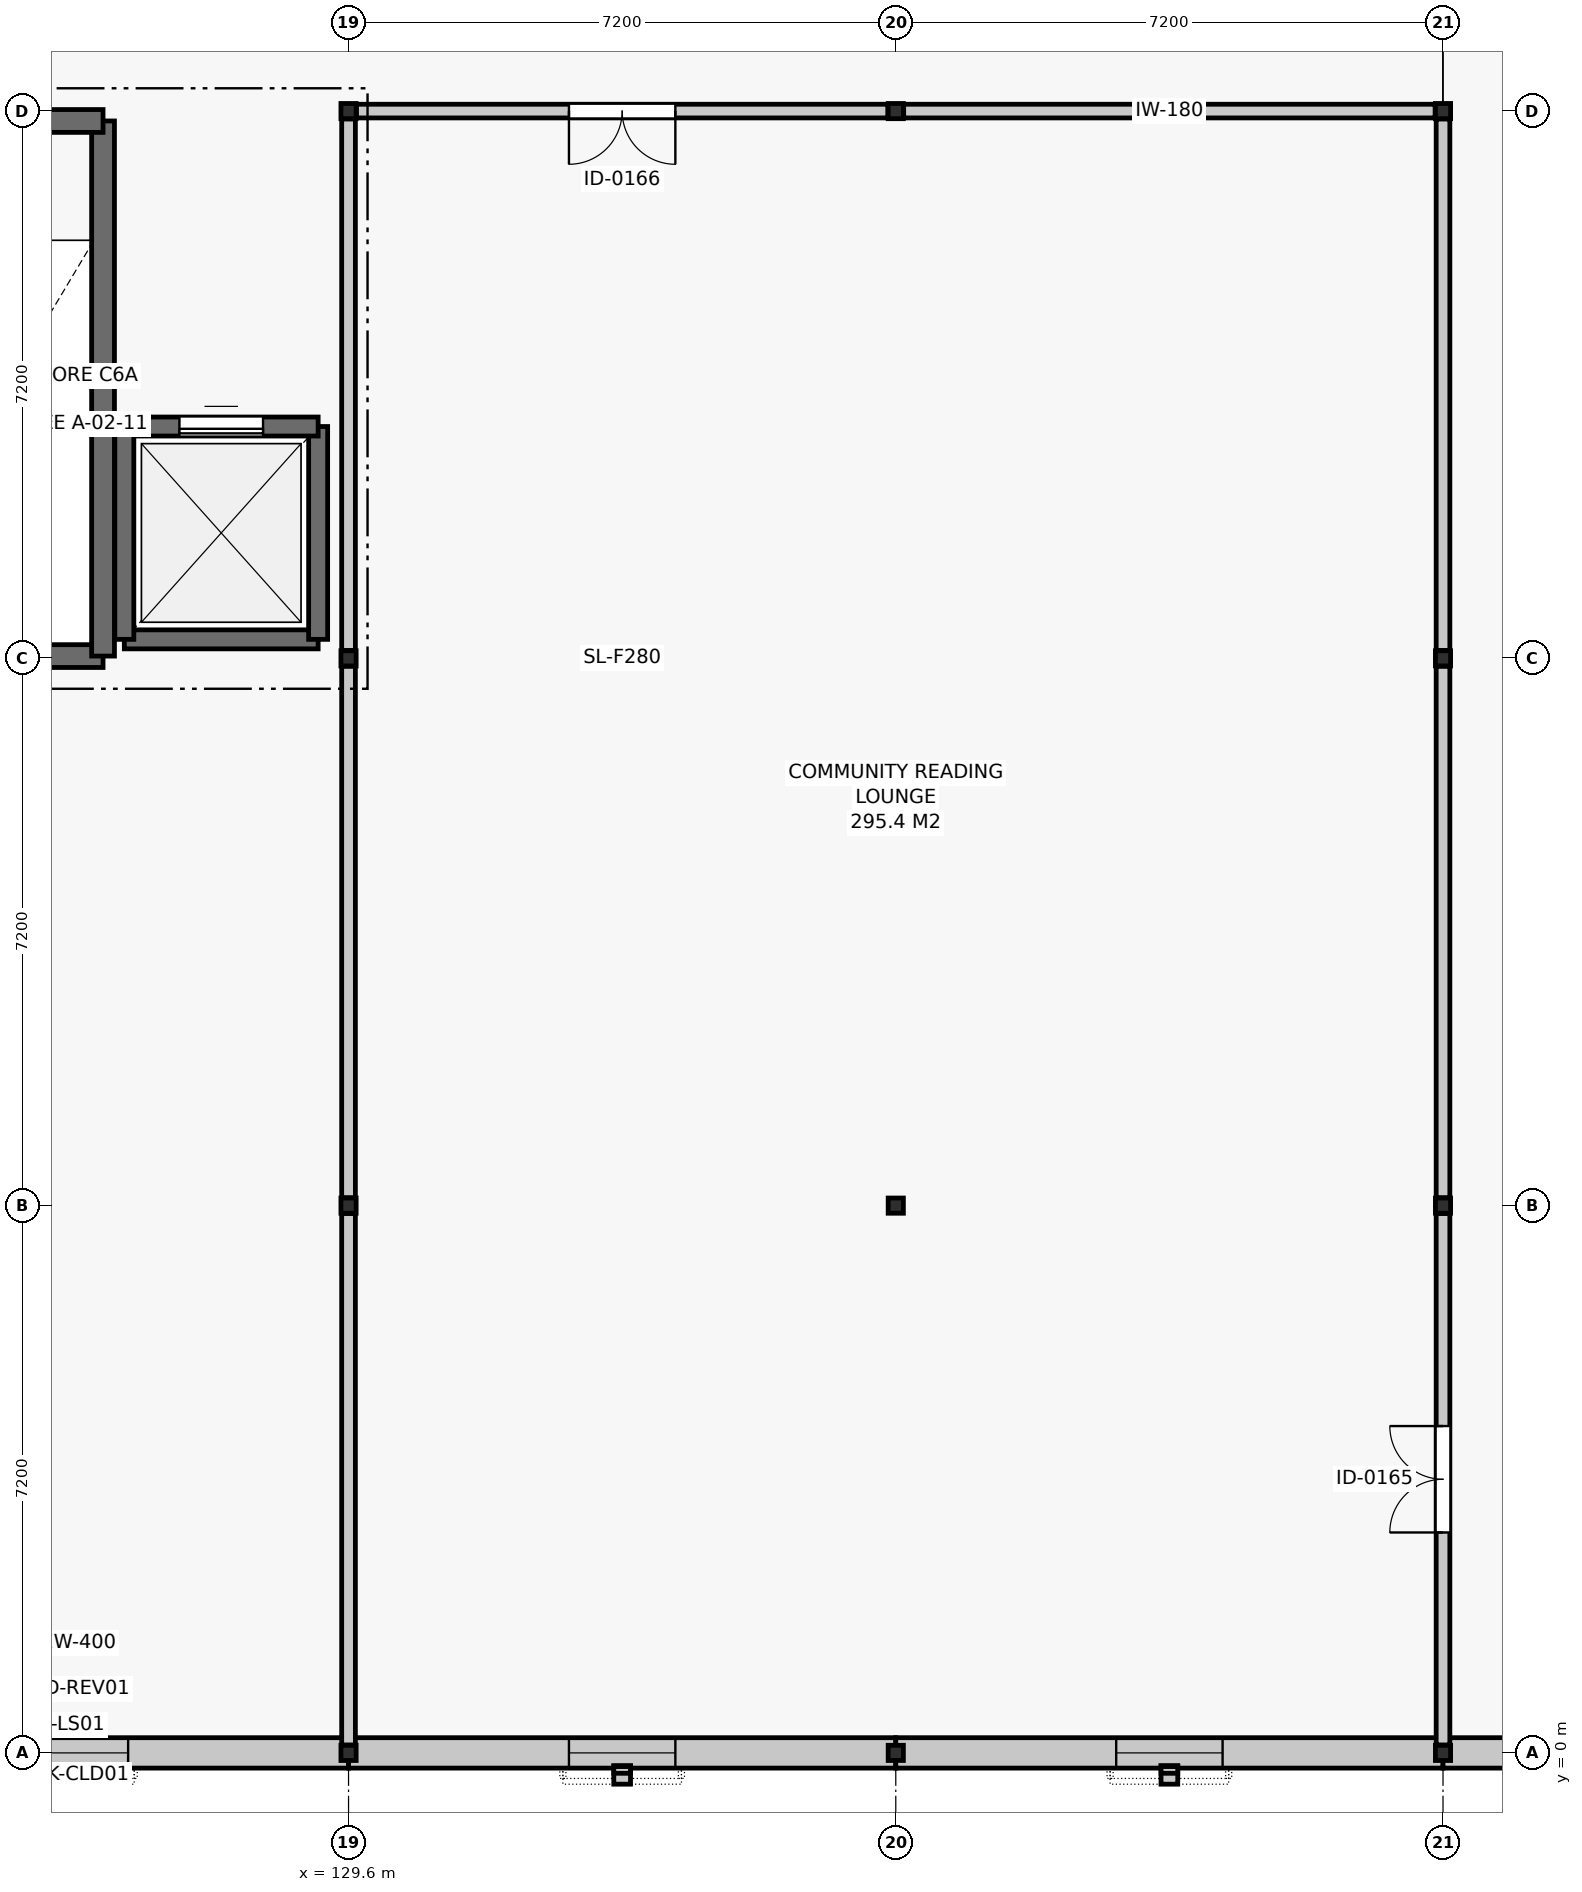
"""IFC4 building model, lengths in metres.
Left out: names, types, materials, properties, quantities, classifications, styles, units other than length and angle.
Written with IfcOpenShell. Run it as: python <this file> out.ifc"""

import sys

from ifc_helpers import new_model, si_unit, direction, frame, frame_2d, origin, origin_2d, place, context, subcontext, project, spatial, rectangle, i_section, extrude, element, fill, save


model = new_model("IFC4")
c1 = context("Model", 3, precision=1e-05, world=origin(), true_north=direction((0.0, 1.0)))
c2 = subcontext(c1, "Body", "Model", "MODEL_VIEW")
j1 = project(units=[si_unit("LENGTHUNIT", "METRE"), si_unit("PLANEANGLEUNIT", "RADIAN")], contexts=[c1])
p1 = place(None, origin())
s1 = spatial("IfcSite", under=j1, at=p1, CompositionType="ELEMENT")
p2 = place(p1, origin())
s2 = spatial("IfcBuilding", under=s1, at=p2, CompositionType="ELEMENT")
p3 = place(p2, frame((0.0, 0.0, 14.4)))
s3 = spatial("IfcBuildingStorey", under=s2, at=p3, CompositionType="ELEMENT", Elevation=14.4)
for number, where, z_axis, x_axis in (
    (1, (129.6, 0.0, 0.0), (0.0, 0.0, 1.0), (1.0, 0.0, 0.0)),
    (2, (129.6, 7.2, 0.0), (0.0, 0.0, 1.0), (1.0, 0.0, 0.0)),
    (3, (129.6, 14.4, 0.0), (0.0, 0.0, 1.0), (1.0, 0.0, 0.0)),
    (4, (129.6, 21.6, 0.0), (0.0, 0.0, 1.0), (1.0, 0.0, 0.0)),
    (5, (136.8, 0.0, 0.0), (0.0, 0.0, 1.0), (1.0, 0.0, 0.0)),
    (6, (136.8, 7.2, 0.0), (0.0, 0.0, 1.0), (1.0, 0.0, 0.0)),
    (7, (136.8, 21.6, 0.0), (0.0, 0.0, 1.0), (1.0, 0.0, 0.0)),
    (8, (144.0, 0.0, 0.0), (0.0, 0.0, 1.0), (1.0, 0.0, 0.0)),
    (9, (144.0, 7.2, 0.0), (0.0, 0.0, 1.0), (1.0, 0.0, 0.0)),
    (10, (144.0, 14.4, 0.0), (0.0, 0.0, 1.0), (1.0, 0.0, 0.0)),
    (11, (144.0, 21.6, 0.0), (0.0, 0.0, 1.0), (1.0, 0.0, 0.0)),
):
    element("IfcColumn", number, at=place(p3, frame(where, z_axis=z_axis, x_axis=x_axis)), inside=s3, PredefinedType="COLUMN", context=c2, shape_type="SweptSolid", body=[
        extrude(i_section(OverallWidth=0.2, OverallDepth=0.2, WebThickness=0.009, FlangeThickness=0.015, FilletRadius=0.018, at=origin_2d()), origin(), (0.0, 0.0, 1.0), 4.2),
    ])
p4 = place(p3, frame((122.504, 0.0, 0.0), z_axis=(0.0, 0.0, 1.0), x_axis=(1.0, 0.0, 0.0)))
e12 = element("IfcWall", 12, at=p4, inside=s3, PredefinedType="SOLIDWALL", context=c2, shape_type="SweptSolid", body=[
    extrude(rectangle(XDim=7.096, YDim=0.4, at=frame_2d((3.548, 0.0))), origin(), (0.0, 0.0, 1.0), 3.24),
])
p5 = place(p4, frame((2.796, 0.0, 0.95)))
e13 = element("IfcOpeningElement", 13, at=p5, cuts=e12, PredefinedType="OPENING", context=c2, shape_type="SweptSolid", body=[
    extrude(rectangle(XDim=1.4, YDim=1.85, at=frame_2d((0.7, 0.925))), frame((0.0, 0.212, 0.0), z_axis=(0.0, -1.0, 0.0), x_axis=(1.0, 0.0, 0.0)), (0.0, 0.0, 1.0), 0.424),
])
p6 = place(p3, frame((129.6, 0.0, 0.0), z_axis=(0.0, 0.0, 1.0), x_axis=(1.0, 0.0, 0.0)))
e14 = element("IfcWall", 14, at=p6, inside=s3, PredefinedType="SOLIDWALL", context=c2, shape_type="SweptSolid", body=[
    extrude(rectangle(XDim=7.2, YDim=0.4, at=frame_2d((3.6, 0.0))), origin(), (0.0, 0.0, 1.0), 3.24),
])
p7 = place(p6, frame((2.9, 0.0, 0.95)))
e15 = element("IfcOpeningElement", 15, at=p7, cuts=e14, PredefinedType="OPENING", context=c2, shape_type="SweptSolid", body=[
    extrude(rectangle(XDim=1.4, YDim=1.85, at=frame_2d((0.7, 0.925))), frame((0.0, 0.212, 0.0), z_axis=(0.0, -1.0, 0.0), x_axis=(1.0, 0.0, 0.0)), (0.0, 0.0, 1.0), 0.424),
])
p8 = place(p3, frame((136.8, 0.0, 0.0), z_axis=(0.0, 0.0, 1.0), x_axis=(1.0, 0.0, 0.0)))
e16 = element("IfcWall", 16, at=p8, inside=s3, PredefinedType="SOLIDWALL", context=c2, shape_type="SweptSolid", body=[
    extrude(rectangle(XDim=7.2, YDim=0.4, at=frame_2d((3.6, 0.0))), origin(), (0.0, 0.0, 1.0), 3.24),
])
p9 = place(p8, frame((2.9, 0.0, 0.95)))
e17 = element("IfcOpeningElement", 17, at=p9, cuts=e16, PredefinedType="OPENING", context=c2, shape_type="SweptSolid", body=[
    extrude(rectangle(XDim=1.4, YDim=1.85, at=frame_2d((0.7, 0.925))), frame((0.0, 0.212, 0.0), z_axis=(0.0, -1.0, 0.0), x_axis=(1.0, 0.0, 0.0)), (0.0, 0.0, 1.0), 0.424),
])
p10 = place(p3, frame((144.0, 0.0, 0.0), z_axis=(0.0, 0.0, 1.0), x_axis=(1.0, 0.0, 0.0)))
e18 = element("IfcWall", 18, at=p10, inside=s3, PredefinedType="SOLIDWALL", context=c2, shape_type="SweptSolid", body=[
    extrude(rectangle(XDim=7.2, YDim=0.4, at=frame_2d((3.6, 0.0))), origin(), (0.0, 0.0, 1.0), 3.24),
])
p11 = place(p3, frame((122.93, 14.43, 0.0), z_axis=(0.0, 0.0, 1.0), x_axis=(1.0, 0.0, 0.0)))
e19 = element("IfcWall", 19, at=p11, inside=s3, PredefinedType="SHEAR", context=c2, shape_type="SweptSolid", body=[
    extrude(rectangle(XDim=3.44, YDim=0.3, at=frame_2d((1.72, 0.0))), origin(), (0.0, 0.0, 1.0), 3.96),
])
p12 = place(p3, frame((126.37, 14.43, 0.0), z_axis=(0.0, 0.0, 1.0), x_axis=(0.0, 1.0, 0.0)))
e20 = element("IfcWall", 20, at=p12, inside=s3, PredefinedType="SHEAR", context=c2, shape_type="SweptSolid", body=[
    extrude(rectangle(XDim=7.04, YDim=0.3, at=frame_2d((3.52, 0.0))), origin(), (0.0, 0.0, 1.0), 3.96),
])
p13 = place(p3, frame((126.37, 21.47, 0.0), z_axis=(0.0, 0.0, 1.0), x_axis=(-1.0, 0.0, 0.0)))
e21 = element("IfcWall", 21, at=p13, inside=s3, PredefinedType="SHEAR", context=c2, shape_type="SweptSolid", body=[
    extrude(rectangle(XDim=3.44, YDim=0.3, at=frame_2d((1.72, 0.0))), origin(), (0.0, 0.0, 1.0), 3.96),
])
p14 = place(p13, frame((1.17, 0.0, 0.0)))
e22 = element("IfcOpeningElement", 22, at=p14, cuts=e21, PredefinedType="OPENING", context=c2, shape_type="SweptSolid", body=[
    extrude(rectangle(XDim=1.1, YDim=2.15, at=frame_2d((0.55, 1.075))), frame((0.0, 0.162, 0.0), z_axis=(0.0, -1.0, 0.0), x_axis=(1.0, 0.0, 0.0)), (0.0, 0.0, 1.0), 0.324),
])
p15 = place(p3, frame((126.65, 14.65, 0.0), z_axis=(0.0, 0.0, 1.0), x_axis=(1.0, 0.0, 0.0)))
e23 = element("IfcWall", 23, at=p15, inside=s3, PredefinedType="SHEAR", context=c2, shape_type="SweptSolid", body=[
    extrude(rectangle(XDim=2.55, YDim=0.25, at=frame_2d((1.275, 0.0))), origin(), (0.0, 0.0, 1.0), 3.96),
])
p16 = place(p3, frame((129.2, 14.65, 0.0), z_axis=(0.0, 0.0, 1.0), x_axis=(0.0, 1.0, 0.0)))
e24 = element("IfcWall", 24, at=p16, inside=s3, PredefinedType="SHEAR", context=c2, shape_type="SweptSolid", body=[
    extrude(rectangle(XDim=2.8, YDim=0.25, at=frame_2d((1.4, 0.0))), origin(), (0.0, 0.0, 1.0), 3.96),
])
p17 = place(p3, frame((129.2, 17.45, 0.0), z_axis=(0.0, 0.0, 1.0), x_axis=(-1.0, 0.0, 0.0)))
e25 = element("IfcWall", 25, at=p17, inside=s3, PredefinedType="SHEAR", context=c2, shape_type="SweptSolid", body=[
    extrude(rectangle(XDim=2.55, YDim=0.25, at=frame_2d((1.275, 0.0))), origin(), (0.0, 0.0, 1.0), 3.96),
])
p18 = place(p17, frame((0.725, 0.0, 0.0)))
e26 = element("IfcOpeningElement", 26, at=p18, cuts=e25, PredefinedType="OPENING", context=c2, shape_type="SweptSolid", body=[
    extrude(rectangle(XDim=1.1, YDim=2.1, at=frame_2d((0.55, 1.05))), frame((0.0, 0.137, 0.0), z_axis=(0.0, -1.0, 0.0), x_axis=(1.0, 0.0, 0.0)), (0.0, 0.0, 1.0), 0.274),
])
p19 = place(p3, frame((126.65, 17.45, 0.0), z_axis=(0.0, 0.0, 1.0), x_axis=(0.0, -1.0, 0.0)))
e27 = element("IfcWall", 27, at=p19, inside=s3, PredefinedType="SHEAR", context=c2, shape_type="SweptSolid", body=[
    extrude(rectangle(XDim=2.8, YDim=0.25, at=frame_2d((1.4, 0.0))), origin(), (0.0, 0.0, 1.0), 3.96),
])
p20 = place(p3, frame((129.704, 21.6, 0.0), z_axis=(0.0, 0.0, 1.0), x_axis=(1.0, 0.0, 0.0)))
e28 = element("IfcWall", 28, at=p20, inside=s3, PredefinedType="PARTITIONING", context=c2, shape_type="SweptSolid", body=[
    extrude(rectangle(XDim=6.992, YDim=0.18, at=frame_2d((3.496, 0.0))), origin(), (0.0, 0.0, 1.0), 3.245),
])
p21 = place(p20, frame((2.796, 0.0, 0.0)))
e29 = element("IfcOpeningElement", 29, at=p21, cuts=e28, PredefinedType="OPENING", context=c2, shape_type="SweptSolid", body=[
    extrude(rectangle(XDim=1.4, YDim=2.2, at=frame_2d((0.7, 1.1))), frame((0.0, 0.102, 0.0), z_axis=(0.0, -1.0, 0.0), x_axis=(1.0, 0.0, 0.0)), (0.0, 0.0, 1.0), 0.204),
])
p22 = place(p3, frame((136.904, 21.6, 0.0), z_axis=(0.0, 0.0, 1.0), x_axis=(1.0, 0.0, 0.0)))
e30 = element("IfcWall", 30, at=p22, inside=s3, PredefinedType="PARTITIONING", context=c2, shape_type="SweptSolid", body=[
    extrude(rectangle(XDim=6.992, YDim=0.18, at=frame_2d((3.496, 0.0))), origin(), (0.0, 0.0, 1.0), 3.245),
])
p23 = place(p3, frame((129.6, 0.104, 0.0), z_axis=(0.0, 0.0, 1.0), x_axis=(0.0, 1.0, 0.0)))
e31 = element("IfcWall", 31, at=p23, inside=s3, PredefinedType="PARTITIONING", context=c2, shape_type="SweptSolid", body=[
    extrude(rectangle(XDim=6.992, YDim=0.18, at=frame_2d((3.496, 0.0))), origin(), (0.0, 0.0, 1.0), 3.595),
])
p24 = place(p3, frame((129.6, 7.304, 0.0), z_axis=(0.0, 0.0, 1.0), x_axis=(0.0, 1.0, 0.0)))
e32 = element("IfcWall", 32, at=p24, inside=s3, PredefinedType="PARTITIONING", context=c2, shape_type="SweptSolid", body=[
    extrude(rectangle(XDim=6.992, YDim=0.18, at=frame_2d((3.496, 0.0))), origin(), (0.0, 0.0, 1.0), 3.055),
])
p25 = place(p3, frame((129.6, 14.504, 0.0), z_axis=(0.0, 0.0, 1.0), x_axis=(0.0, 1.0, 0.0)))
e33 = element("IfcWall", 33, at=p25, inside=s3, PredefinedType="PARTITIONING", context=c2, shape_type="SweptSolid", body=[
    extrude(rectangle(XDim=6.992, YDim=0.18, at=frame_2d((3.496, 0.0))), origin(), (0.0, 0.0, 1.0), 3.055),
])
p26 = place(p3, frame((144.0, 0.104, 0.0), z_axis=(0.0, 0.0, 1.0), x_axis=(0.0, 1.0, 0.0)))
e34 = element("IfcWall", 34, at=p26, inside=s3, PredefinedType="PARTITIONING", context=c2, shape_type="SweptSolid", body=[
    extrude(rectangle(XDim=6.992, YDim=0.18, at=frame_2d((3.496, 0.0))), origin(), (0.0, 0.0, 1.0), 3.595),
])
p27 = place(p26, frame((2.796, 0.0, 0.0)))
e35 = element("IfcOpeningElement", 35, at=p27, cuts=e34, PredefinedType="OPENING", context=c2, shape_type="SweptSolid", body=[
    extrude(rectangle(XDim=1.4, YDim=2.2, at=frame_2d((0.7, 1.1))), frame((0.0, 0.102, 0.0), z_axis=(0.0, -1.0, 0.0), x_axis=(1.0, 0.0, 0.0)), (0.0, 0.0, 1.0), 0.204),
])
p28 = place(p3, frame((144.0, 7.304, 0.0), z_axis=(0.0, 0.0, 1.0), x_axis=(0.0, 1.0, 0.0)))
e36 = element("IfcWall", 36, at=p28, inside=s3, PredefinedType="PARTITIONING", context=c2, shape_type="SweptSolid", body=[
    extrude(rectangle(XDim=6.992, YDim=0.18, at=frame_2d((3.496, 0.0))), origin(), (0.0, 0.0, 1.0), 3.055),
])
p29 = place(p3, frame((144.0, 14.504, 0.0), z_axis=(0.0, 0.0, 1.0), x_axis=(0.0, 1.0, 0.0)))
e37 = element("IfcWall", 37, at=p29, inside=s3, PredefinedType="PARTITIONING", context=c2, shape_type="SweptSolid", body=[
    extrude(rectangle(XDim=6.992, YDim=0.18, at=frame_2d((3.496, 0.0))), origin(), (0.0, 0.0, 1.0), 3.055),
])
p30 = place(p5, origin())
e38 = element("IfcWindow", 38, at=p30, inside=s3, PartitioningType="SINGLE_PANEL", PredefinedType="WINDOW", context=c2, shape_type="SweptSolid", body=[
    extrude(rectangle(XDim=1.4, YDim=1.85, at=frame_2d((0.7, 0.925))), frame((0.0, 0.03, 0.0), z_axis=(0.0, -1.0, 0.0), x_axis=(1.0, 0.0, 0.0)), (0.0, 0.0, 1.0), 0.06),
])
fill(e13, e38)
p31 = place(p7, origin())
e39 = element("IfcWindow", 39, at=p31, inside=s3, PartitioningType="SINGLE_PANEL", PredefinedType="WINDOW", context=c2, shape_type="SweptSolid", body=[
    extrude(rectangle(XDim=1.4, YDim=1.85, at=frame_2d((0.7, 0.925))), frame((0.0, 0.03, 0.0), z_axis=(0.0, -1.0, 0.0), x_axis=(1.0, 0.0, 0.0)), (0.0, 0.0, 1.0), 0.06),
])
fill(e15, e39)
p32 = place(p9, origin())
e40 = element("IfcWindow", 40, at=p32, inside=s3, PartitioningType="SINGLE_PANEL", PredefinedType="WINDOW", context=c2, shape_type="SweptSolid", body=[
    extrude(rectangle(XDim=1.4, YDim=1.85, at=frame_2d((0.7, 0.925))), frame((0.0, 0.03, 0.0), z_axis=(0.0, -1.0, 0.0), x_axis=(1.0, 0.0, 0.0)), (0.0, 0.0, 1.0), 0.06),
])
fill(e17, e40)
p33 = place(p18, origin())
e41 = element("IfcDoor", 41, at=p33, inside=s3, OperationType="SLIDING_TO_LEFT", PredefinedType="DOOR", context=c2, shape_type="SweptSolid", body=[
    extrude(rectangle(XDim=1.1, YDim=2.1, at=frame_2d((0.55, 1.05))), frame((0.0, 0.025, 0.0), z_axis=(0.0, -1.0, 0.0), x_axis=(1.0, 0.0, 0.0)), (0.0, 0.0, 1.0), 0.05),
])
fill(e26, e41)
p34 = place(p27, origin())
e42 = element("IfcDoor", 42, at=p34, inside=s3, OperationType="DOUBLE_DOOR_SINGLE_SWING", PredefinedType="DOOR", context=c2, shape_type="SweptSolid", body=[
    extrude(rectangle(XDim=1.4, YDim=2.2, at=frame_2d((0.7, 1.1))), frame((0.0, 0.025, 0.0), z_axis=(0.0, -1.0, 0.0), x_axis=(1.0, 0.0, 0.0)), (0.0, 0.0, 1.0), 0.05),
])
fill(e35, e42)
p35 = place(p21, frame((1.4, 0.0, 0.0), z_axis=(0.0, 0.0, 1.0), x_axis=(-1.0, 0.0, 0.0)))
e43 = element("IfcDoor", 43, at=p35, inside=s3, OperationType="DOUBLE_DOOR_SINGLE_SWING", PredefinedType="DOOR", context=c2, shape_type="SweptSolid", body=[
    extrude(rectangle(XDim=1.4, YDim=2.2, at=frame_2d((0.7, 1.1))), frame((0.0, 0.025, 0.0), z_axis=(0.0, -1.0, 0.0), x_axis=(1.0, 0.0, 0.0)), (0.0, 0.0, 1.0), 0.05),
])
fill(e29, e43)
save(model, sys.argv[1])
